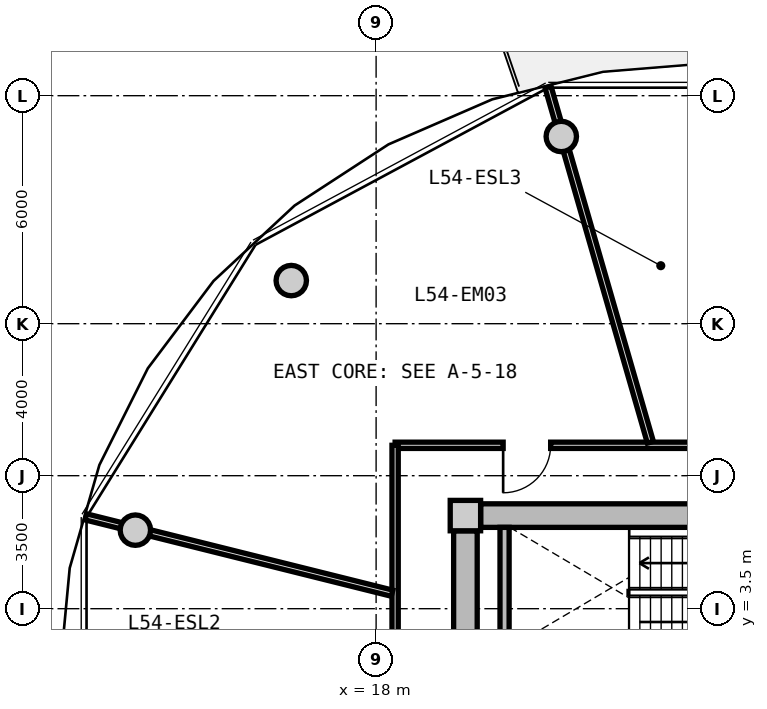
"""IFC4 building model, lengths in metres.
Left out: names, types, materials, properties, quantities, classifications, styles, units other than length and angle.
Written with IfcOpenShell. Run it as: python <this file> out.ifc"""

import sys

from ifc_helpers import new_model, si_unit, direction, frame, frame_2d, origin, origin_2d, place, context, subcontext, project, spatial, rectangle, circle, extrude, source, transform, mapped, element, fill, save


model = new_model("IFC4")
c1 = context("Model", 3, precision=1e-05, world=origin(), true_north=direction((0.0, 1.0)))
c2 = subcontext(c1, "Body", "Model", "MODEL_VIEW")
j1 = project(units=[si_unit("LENGTHUNIT", "METRE"), si_unit("PLANEANGLEUNIT", "RADIAN")], contexts=[c1])
p1 = place(None, origin())
s1 = spatial("IfcSite", under=j1, at=p1, CompositionType="ELEMENT")
p2 = place(p1, origin())
s2 = spatial("IfcBuilding", under=s1, at=p2, CompositionType="ELEMENT")
p3 = place(p2, frame((0.0, 0.0, 173.95)))
s3 = spatial("IfcBuildingStorey", under=s2, at=p3, CompositionType="ELEMENT", Elevation=173.95)
m1 = source(origin(), c2, "Body", "SweptSolid", [
    extrude(rectangle(XDim=0.8, YDim=0.8, at=origin_2d()), origin(), (0.0, 0.0, 1.0), 3.05),
])
p4 = place(p3, frame((20.35, 5.95, 0.0), z_axis=(0.0, 0.0, 1.0), x_axis=(1.0, 0.0, 0.0)))
e1 = element("IfcColumn", 1, at=p4, inside=s3, PredefinedType="COLUMN", context=c2, shape_type="MappedRepresentation", body=[
    mapped(m1, transform((0.0, 0.0, 0.0), x_axis=(1.0, 0.0, 0.0), y_axis=(0.0, 1.0, 0.0), z_axis=(0.0, 0.0, 1.0), scale=1.0)),
])
m2 = source(origin(), c2, "Body", "SweptSolid", [
    extrude(rectangle(XDim=14.5, YDim=0.62, at=frame_2d((7.25, 0.0))), origin(), (0.0, 0.0, 1.0), 2.81),
])
p5 = place(p3, frame((20.75, 5.95, 0.0), z_axis=(0.0, 0.0, 1.0), x_axis=(1.0, 0.0, 0.0)))
e2 = element("IfcWall", 2, at=p5, inside=s3, PredefinedType="SHEAR", context=c2, shape_type="MappedRepresentation", body=[
    mapped(m2, transform((0.0, 0.0, 0.0), x_axis=(1.0, 0.0, 0.0), y_axis=(0.0, 1.0, 0.0), z_axis=(0.0, 0.0, 1.0), scale=1.0)),
])
m3 = source(origin(), c2, "Body", "SweptSolid", [
    extrude(rectangle(XDim=11.1, YDim=0.62, at=frame_2d((5.55, 0.0))), origin(), (0.0, 0.0, 1.0), 2.81),
])
p6 = place(p3, frame((20.35, -5.55, 0.0), z_axis=(0.0, 0.0, 1.0), x_axis=(0.0, 1.0, 0.0)))
e3 = element("IfcWall", 3, at=p6, inside=s3, PredefinedType="SHEAR", context=c2, shape_type="MappedRepresentation", body=[
    mapped(m3, transform((0.0, 0.0, 0.0), x_axis=(1.0, 0.0, 0.0), y_axis=(0.0, 1.0, 0.0), z_axis=(0.0, 0.0, 1.0), scale=1.0)),
])
p7 = place(p6, frame((3.8, 0.0, 0.0)))
e4 = element("IfcOpeningElement", 4, at=p7, cuts=e3, PredefinedType="OPENING", context=c2, shape_type="SweptSolid", body=[
    extrude(rectangle(XDim=1.2, YDim=2.15, at=frame_2d((0.6, 1.075))), frame((0.0, 0.32, 0.0), z_axis=(0.0, -1.0, 0.0), x_axis=(1.0, 0.0, 0.0)), (0.0, 0.0, 1.0), 0.64),
])
m4 = source(origin(), c2, "Body", "SweptSolid", [
    extrude(circle(Radius=0.4, at=origin_2d()), origin(), (0.0, 0.0, 1.0), 3.05),
])
for number, where, z_axis, x_axis in (
    (5, (22.873, 15.926, 0.0), (0.0, 0.0, 1.0), (1.0, 0.0, 0.0)),
    (6, (15.767, 12.135, 0.0), (0.0, 0.0, 1.0), (1.0, 0.0, 0.0)),
    (7, (11.665, 5.567, 0.0), (0.0, 0.0, 1.0), (1.0, 0.0, 0.0)),
):
    element("IfcColumn", number, at=place(p3, frame(where, z_axis=z_axis, x_axis=x_axis)), inside=s3, PredefinedType="COLUMN", context=c2, shape_type="MappedRepresentation", body=[
        mapped(m4, transform((0.0, 0.0, 0.0), x_axis=(1.0, 0.0, 0.0), y_axis=(0.0, 1.0, 0.0), z_axis=(0.0, 0.0, 1.0), scale=1.0)),
    ])
m5 = source(origin(), c2, "Body", "SweptSolid", [
    extrude(rectangle(XDim=3.19, YDim=0.24, at=frame_2d((1.595, 0.0))), origin(), (0.0, 0.0, 1.0), 2.81),
])
p8 = place(p3, frame((21.38, 2.45, 0.0), z_axis=(0.0, 0.0, 1.0), x_axis=(0.0, 1.0, 0.0)))
e8 = element("IfcWall", 8, at=p8, inside=s3, PredefinedType="PARTITIONING", context=c2, shape_type="MappedRepresentation", body=[
    mapped(m5, transform((0.0, 0.0, 0.0), x_axis=(1.0, 0.0, 0.0), y_axis=(0.0, 1.0, 0.0), z_axis=(0.0, 0.0, 1.0), scale=1.0)),
])
m6 = source(origin(), c2, "Body", "SweptSolid", [
    extrude(rectangle(XDim=8.58, YDim=0.165, at=frame_2d((4.29, 0.0))), origin(), (0.0, 0.0, 1.0), 2.795),
])
p9 = place(p3, frame((18.5, 7.8, 0.0), z_axis=(0.0, 0.0, 1.0), x_axis=(1.0, 0.0, 0.0)))
e9 = element("IfcWall", 9, at=p9, inside=s3, PredefinedType="PARTITIONING", context=c2, shape_type="MappedRepresentation", body=[
    mapped(m6, transform((0.0, 0.0, 0.0), x_axis=(1.0, 0.0, 0.0), y_axis=(0.0, 1.0, 0.0), z_axis=(0.0, 0.0, 1.0), scale=1.0)),
])
p10 = place(p9, frame((2.843, 0.0, 0.0)))
e10 = element("IfcOpeningElement", 10, at=p10, cuts=e9, PredefinedType="OPENING", context=c2, shape_type="SweptSolid", body=[
    extrude(rectangle(XDim=1.25, YDim=2.2, at=frame_2d((0.625, 1.1))), frame((0.0, 0.093, 0.0), z_axis=(0.0, -1.0, 0.0), x_axis=(1.0, 0.0, 0.0)), (0.0, 0.0, 1.0), 0.185),
])
m7 = source(origin(), c2, "Body", "SweptSolid", [
    extrude(rectangle(XDim=6.88, YDim=0.165, at=frame_2d((3.44, 0.0))), origin(), (0.0, 0.0, 1.0), 2.795),
])
p11 = place(p3, frame((18.5, 0.92, 0.0), z_axis=(0.0, 0.0, 1.0), x_axis=(0.0, 1.0, 0.0)))
e11 = element("IfcWall", 11, at=p11, inside=s3, PredefinedType="PARTITIONING", context=c2, shape_type="MappedRepresentation", body=[
    mapped(m7, transform((0.0, 0.0, 0.0), x_axis=(1.0, 0.0, 0.0), y_axis=(0.0, 1.0, 0.0), z_axis=(0.0, 0.0, 1.0), scale=1.0)),
])
m8 = source(origin(), c2, "Body", "SweptSolid", [
    extrude(rectangle(XDim=9.73, YDim=0.165, at=frame_2d((4.865, 0.0))), origin(), (0.0, 0.0, 1.0), 2.345),
])
p12 = place(p3, frame((25.217, 7.88, 0.0), z_axis=(0.0, 0.0, 1.0), x_axis=(-0.27679492614, 0.960929013436, 0.0)))
e12 = element("IfcWall", 12, at=p12, inside=s3, PredefinedType="PARTITIONING", context=c2, shape_type="MappedRepresentation", body=[
    mapped(m8, transform((0.0, 0.0, 0.0), x_axis=(1.0, 0.0, 0.0), y_axis=(0.0, 1.0, 0.0), z_axis=(0.0, 0.0, 1.0), scale=1.0)),
])
m9 = source(origin(), c2, "Body", "SweptSolid", [
    extrude(rectangle(XDim=8.305, YDim=0.165, at=frame_2d((4.153, 0.0))), origin(), (0.0, 0.0, 1.0), 2.345),
])
p13 = place(p3, frame((18.42, 3.908, 0.0), z_axis=(0.0, 0.0, 1.0), x_axis=(-0.970309994378, 0.241864662175, 0.0)))
e13 = element("IfcWall", 13, at=p13, inside=s3, PredefinedType="PARTITIONING", context=c2, shape_type="MappedRepresentation", body=[
    mapped(m9, transform((0.0, 0.0, 0.0), x_axis=(1.0, 0.0, 0.0), y_axis=(0.0, 1.0, 0.0), z_axis=(0.0, 0.0, 1.0), scale=1.0)),
])
m10 = source(origin(), c2, "Body", "SweptSolid", [
    extrude(rectangle(XDim=1.25, YDim=2.2, at=frame_2d((0.625, 1.1))), frame((0.0, 0.025, 0.0), z_axis=(0.0, -1.0, 0.0), x_axis=(1.0, 0.0, 0.0)), (0.0, 0.0, 1.0), 0.05),
])
p14 = place(p10, frame((1.25, 0.0, 0.0), z_axis=(0.0, 0.0, 1.0), x_axis=(-1.0, 0.0, 0.0)))
e14 = element("IfcDoor", 14, at=p14, inside=s3, OperationType="SINGLE_SWING_RIGHT", PredefinedType="DOOR", context=c2, shape_type="MappedRepresentation", body=[
    mapped(m10, transform((0.0, 0.0, 0.0), x_axis=(1.0, 0.0, 0.0), y_axis=(0.0, 1.0, 0.0), z_axis=(0.0, 0.0, 1.0), scale=1.0)),
])
fill(e10, e14)
save(model, sys.argv[1])
